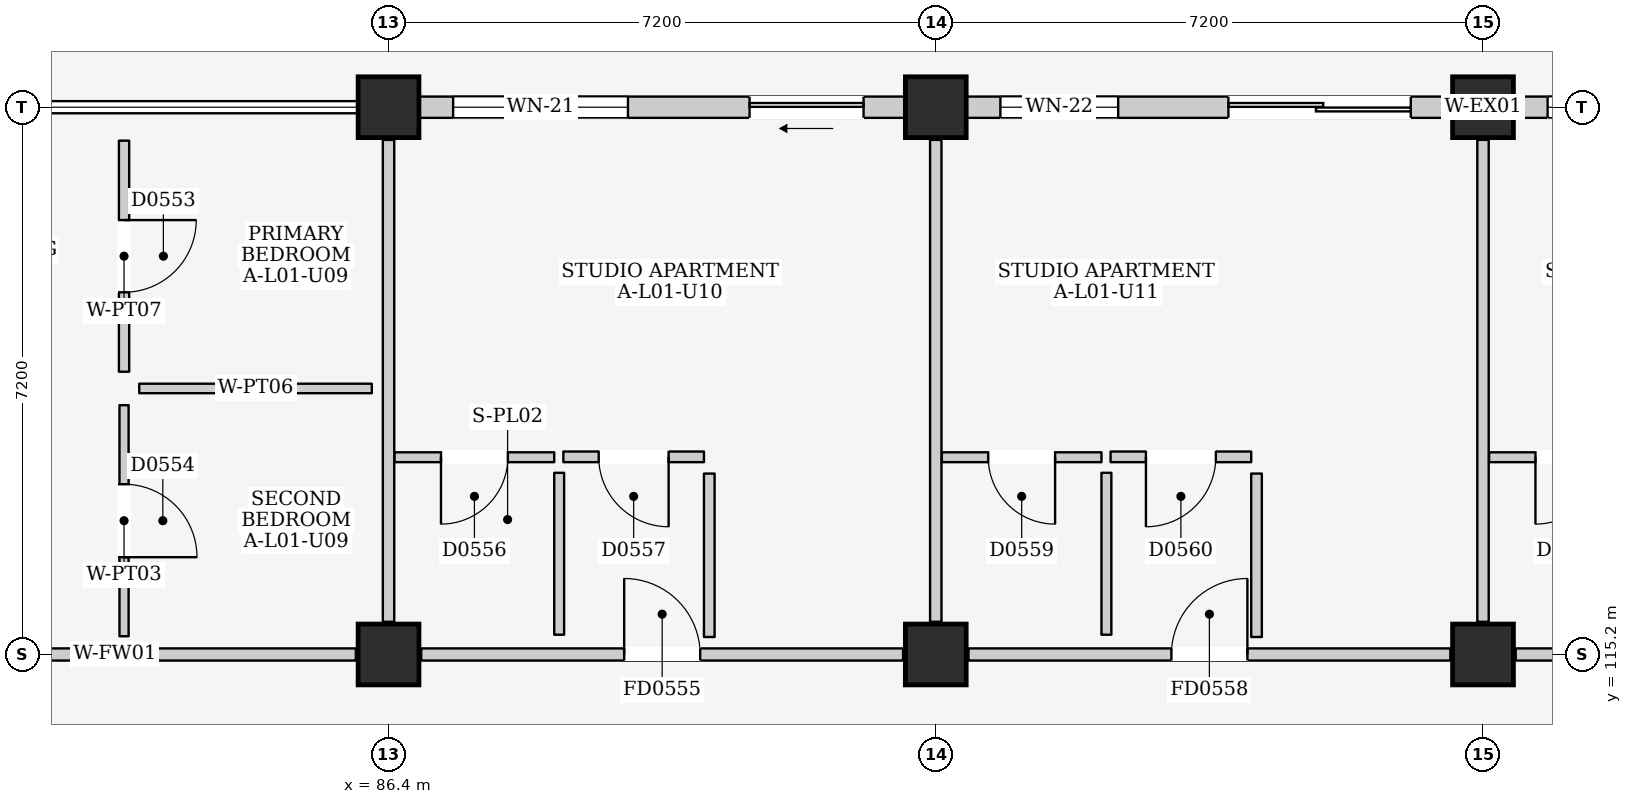
"""IFC4 building model, lengths in metres.
Left out: names, types, materials, properties, quantities, classifications, styles, units other than length and angle.
Written with IfcOpenShell. Run it as: python <this file> out.ifc"""

import sys

from ifc_helpers import new_model, si_unit, direction, frame, frame_2d, origin, origin_2d, place, context, subcontext, project, spatial, rectangle, extrude, element, fill, save


model = new_model("IFC4")
c1 = context("Model", 3, precision=1e-05, world=origin(), true_north=direction((0.0, 1.0)))
c2 = subcontext(c1, "Body", "Model", "MODEL_VIEW")
j1 = project(units=[si_unit("LENGTHUNIT", "METRE"), si_unit("PLANEANGLEUNIT", "RADIAN")], contexts=[c1])
p1 = place(None, origin())
s1 = spatial("IfcSite", under=j1, at=p1, CompositionType="ELEMENT")
p2 = place(p1, origin())
s2 = spatial("IfcBuilding", under=s1, at=p2, CompositionType="ELEMENT")
p3 = place(p2, frame((0.0, 0.0, 4.5)))
s3 = spatial("IfcBuildingStorey", under=s2, at=p3, CompositionType="ELEMENT", Elevation=4.5)
for number, where, z_axis, x_axis in (
    (1, (86.4, 115.2, 0.0), (0.0, 0.0, 1.0), (1.0, 0.0, 0.0)),
    (2, (86.4, 122.4, 0.0), (0.0, 0.0, 1.0), (1.0, 0.0, 0.0)),
    (3, (93.6, 115.2, 0.0), (0.0, 0.0, 1.0), (1.0, 0.0, 0.0)),
    (4, (93.6, 122.4, 0.0), (0.0, 0.0, 1.0), (1.0, 0.0, 0.0)),
    (5, (100.8, 115.2, 0.0), (0.0, 0.0, 1.0), (1.0, 0.0, 0.0)),
    (6, (100.8, 122.4, 0.0), (0.0, 0.0, 1.0), (1.0, 0.0, 0.0)),
):
    element("IfcColumn", number, at=place(p3, frame(where, z_axis=z_axis, x_axis=x_axis)), inside=s3, PredefinedType="COLUMN", context=c2, shape_type="SweptSolid", body=[
        extrude(rectangle(XDim=0.8, YDim=0.8, at=origin_2d()), origin(), (0.0, 0.0, 1.0), 4.5),
    ])
p4 = place(p3, frame((86.8, 122.4, 0.0), z_axis=(0.0, 0.0, 1.0), x_axis=(1.0, 0.0, 0.0)))
e7 = element("IfcWall", 7, at=p4, inside=s3, PredefinedType="ELEMENTEDWALL", context=c2, shape_type="SweptSolid", body=[
    extrude(rectangle(XDim=6.4, YDim=0.28, at=frame_2d((3.2, 0.0))), origin(), (0.0, 0.0, 1.0), 3.715),
])
p5 = place(p4, frame((4.35, 0.0, 0.0)))
e8 = element("IfcOpeningElement", 8, at=p5, cuts=e7, PredefinedType="OPENING", context=c2, shape_type="SweptSolid", body=[
    extrude(rectangle(XDim=1.5, YDim=2.12, at=frame_2d((0.75, 1.06))), frame((0.0, 0.155, 0.0), z_axis=(0.0, -1.0, 0.0), x_axis=(1.0, 0.0, 0.0)), (0.0, 0.0, 1.0), 0.31),
])
p6 = place(p4, frame((0.45, 0.0, 0.9)))
e9 = element("IfcOpeningElement", 9, at=p6, cuts=e7, PredefinedType="OPENING", context=c2, shape_type="SweptSolid", body=[
    extrude(rectangle(XDim=2.3, YDim=1.6, at=frame_2d((1.15, 0.8))), frame((0.0, 0.155, 0.0), z_axis=(0.0, -1.0, 0.0), x_axis=(1.0, 0.0, 0.0)), (0.0, 0.0, 1.0), 0.31),
])
p7 = place(p3, frame((94.0, 122.4, 0.0), z_axis=(0.0, 0.0, 1.0), x_axis=(1.0, 0.0, 0.0)))
e10 = element("IfcWall", 10, at=p7, inside=s3, PredefinedType="ELEMENTEDWALL", context=c2, shape_type="SweptSolid", body=[
    extrude(rectangle(XDim=6.4, YDim=0.28, at=frame_2d((3.2, 0.0))), origin(), (0.0, 0.0, 1.0), 3.715),
])
p8 = place(p7, frame((3.45, 0.0, 0.0)))
e11 = element("IfcOpeningElement", 11, at=p8, cuts=e10, PredefinedType="OPENING", context=c2, shape_type="SweptSolid", body=[
    extrude(rectangle(XDim=2.4, YDim=2.12, at=frame_2d((1.2, 1.06))), frame((0.0, 0.155, 0.0), z_axis=(0.0, -1.0, 0.0), x_axis=(1.0, 0.0, 0.0)), (0.0, 0.0, 1.0), 0.31),
])
p9 = place(p7, frame((0.45, 0.0, 0.9)))
e12 = element("IfcOpeningElement", 12, at=p9, cuts=e10, PredefinedType="OPENING", context=c2, shape_type="SweptSolid", body=[
    extrude(rectangle(XDim=1.55, YDim=1.45, at=frame_2d((0.775, 0.725))), frame((0.0, 0.155, 0.0), z_axis=(0.0, -1.0, 0.0), x_axis=(1.0, 0.0, 0.0)), (0.0, 0.0, 1.0), 0.31),
])
p10 = place(p3, frame((101.2, 122.4, 0.0), z_axis=(0.0, 0.0, 1.0), x_axis=(1.0, 0.0, 0.0)))
e13 = element("IfcWall", 13, at=p10, inside=s3, PredefinedType="ELEMENTEDWALL", context=c2, shape_type="SweptSolid", body=[
    extrude(rectangle(XDim=6.4, YDim=0.28, at=frame_2d((3.2, 0.0))), origin(), (0.0, 0.0, 1.0), 3.715),
])
p11 = place(p10, frame((3.85, 0.0, 0.0)))
e14 = element("IfcOpeningElement", 14, at=p11, cuts=e13, PredefinedType="OPENING", context=c2, shape_type="SweptSolid", body=[
    extrude(rectangle(XDim=2.0, YDim=2.12, at=frame_2d((1.0, 1.06))), frame((0.0, 0.155, 0.0), z_axis=(0.0, -1.0, 0.0), x_axis=(1.0, 0.0, 0.0)), (0.0, 0.0, 1.0), 0.31),
])
p12 = place(p10, frame((0.45, 0.0, 0.9)))
e15 = element("IfcOpeningElement", 15, at=p12, cuts=e13, PredefinedType="OPENING", context=c2, shape_type="SweptSolid", body=[
    extrude(rectangle(XDim=1.85, YDim=1.4, at=frame_2d((0.925, 0.7))), frame((0.0, 0.155, 0.0), z_axis=(0.0, -1.0, 0.0), x_axis=(1.0, 0.0, 0.0)), (0.0, 0.0, 1.0), 0.31),
])
p13 = place(p3, frame((79.63, 115.2, 0.0), z_axis=(0.0, 0.0, 1.0), x_axis=(1.0, 0.0, 0.0)))
e16 = element("IfcWall", 16, at=p13, inside=s3, PredefinedType="PARTITIONING", context=c2, shape_type="SweptSolid", body=[
    extrude(rectangle(XDim=6.34, YDim=0.16, at=frame_2d((3.17, 0.0))), origin(), (0.0, 0.0, 1.0), 3.585),
])
p14 = place(p3, frame((86.4, 115.63, 0.0), z_axis=(0.0, 0.0, 1.0), x_axis=(0.0, 1.0, 0.0)))
e17 = element("IfcWall", 17, at=p14, inside=s3, PredefinedType="PARTITIONING", context=c2, shape_type="SweptSolid", body=[
    extrude(rectangle(XDim=6.34, YDim=0.15, at=frame_2d((3.17, 0.0))), origin(), (0.0, 0.0, 1.0), 3.685),
])
p15 = place(p3, frame((82.92, 118.92, 0.0), z_axis=(0.0, 0.0, 1.0), x_axis=(0.0, 1.0, 0.0)))
e18 = element("IfcWall", 18, at=p15, inside=s3, PredefinedType="PARTITIONING", context=c2, shape_type="SweptSolid", body=[
    extrude(rectangle(XDim=3.04, YDim=0.135, at=frame_2d((1.52, 0.0))), origin(), (0.0, 0.0, 1.0), 4.25),
])
p16 = place(p15, frame((1.045, 0.0, 0.0)))
e19 = element("IfcOpeningElement", 19, at=p16, cuts=e18, PredefinedType="OPENING", context=c2, shape_type="SweptSolid", body=[
    extrude(rectangle(XDim=0.95, YDim=2.15, at=frame_2d((0.475, 1.075))), frame((0.0, 0.083, 0.0), z_axis=(0.0, -1.0, 0.0), x_axis=(1.0, 0.0, 0.0)), (0.0, 0.0, 1.0), 0.165),
])
p17 = place(p3, frame((83.12, 118.7, 0.0), z_axis=(0.0, 0.0, 1.0), x_axis=(1.0, 0.0, 0.0)))
e20 = element("IfcWall", 20, at=p17, inside=s3, PredefinedType="PARTITIONING", context=c2, shape_type="SweptSolid", body=[
    extrude(rectangle(XDim=3.06, YDim=0.125, at=frame_2d((1.53, 0.0))), origin(), (0.0, 0.0, 1.0), 4.25),
])
p18 = place(p3, frame((82.92, 115.44, 0.0), z_axis=(0.0, 0.0, 1.0), x_axis=(0.0, 1.0, 0.0)))
e21 = element("IfcWall", 21, at=p18, inside=s3, PredefinedType="PARTITIONING", context=c2, shape_type="SweptSolid", body=[
    extrude(rectangle(XDim=3.04, YDim=0.12, at=frame_2d((1.52, 0.0))), origin(), (0.0, 0.0, 1.0), 4.25),
])
p19 = place(p18, frame((1.04, 0.0, 0.0)))
e22 = element("IfcOpeningElement", 22, at=p19, cuts=e21, PredefinedType="OPENING", context=c2, shape_type="SweptSolid", body=[
    extrude(rectangle(XDim=0.96, YDim=2.15, at=frame_2d((0.48, 1.075))), frame((0.0, 0.075, 0.0), z_axis=(0.0, -1.0, 0.0), x_axis=(1.0, 0.0, 0.0)), (0.0, 0.0, 1.0), 0.15),
])
p20 = place(p3, frame((86.83, 115.2, 0.0), z_axis=(0.0, 0.0, 1.0), x_axis=(1.0, 0.0, 0.0)))
e23 = element("IfcWall", 23, at=p20, inside=s3, PredefinedType="PARTITIONING", context=c2, shape_type="SweptSolid", body=[
    extrude(rectangle(XDim=6.34, YDim=0.16, at=frame_2d((3.17, 0.0))), origin(), (0.0, 0.0, 1.0), 3.585),
])
p21 = place(p20, frame((2.67, 0.0, 0.0)))
e24 = element("IfcOpeningElement", 24, at=p21, cuts=e23, PredefinedType="OPENING", context=c2, shape_type="SweptSolid", body=[
    extrude(rectangle(XDim=1.0, YDim=2.15, at=frame_2d((0.5, 1.075))), frame((0.0, 0.095, 0.0), z_axis=(0.0, -1.0, 0.0), x_axis=(1.0, 0.0, 0.0)), (0.0, 0.0, 1.0), 0.19),
])
p22 = place(p3, frame((93.6, 115.63, 0.0), z_axis=(0.0, 0.0, 1.0), x_axis=(0.0, 1.0, 0.0)))
e25 = element("IfcWall", 25, at=p22, inside=s3, PredefinedType="PARTITIONING", context=c2, shape_type="SweptSolid", body=[
    extrude(rectangle(XDim=6.34, YDim=0.15, at=frame_2d((3.17, 0.0))), origin(), (0.0, 0.0, 1.0), 3.685),
])
p23 = place(p3, frame((86.48, 117.795, 0.0), z_axis=(0.0, 0.0, 1.0), x_axis=(1.0, 0.0, 0.0)))
e26 = element("IfcWall", 26, at=p23, inside=s3, PredefinedType="PARTITIONING", context=c2, shape_type="SweptSolid", body=[
    extrude(rectangle(XDim=2.1, YDim=0.13, at=frame_2d((1.05, 0.0))), origin(), (0.0, 0.0, 1.0), 4.25),
])
p24 = place(p23, frame((0.61, 0.0, 0.0)))
e27 = element("IfcOpeningElement", 27, at=p24, cuts=e26, PredefinedType="OPENING", context=c2, shape_type="SweptSolid", body=[
    extrude(rectangle(XDim=0.88, YDim=2.1, at=frame_2d((0.44, 1.05))), frame((0.0, 0.08, 0.0), z_axis=(0.0, -1.0, 0.0), x_axis=(1.0, 0.0, 0.0)), (0.0, 0.0, 1.0), 0.16),
])
p25 = place(p3, frame((88.645, 115.46, 0.0), z_axis=(0.0, 0.0, 1.0), x_axis=(0.0, 1.0, 0.0)))
e28 = element("IfcWall", 28, at=p25, inside=s3, PredefinedType="PARTITIONING", context=c2, shape_type="SweptSolid", body=[
    extrude(rectangle(XDim=2.13, YDim=0.13, at=frame_2d((1.065, 0.0))), origin(), (0.0, 0.0, 1.0), 4.25),
])
p26 = place(p3, frame((88.7, 117.8, 0.0), z_axis=(0.0, 0.0, 1.0), x_axis=(1.0, 0.0, 0.0)))
e29 = element("IfcWall", 29, at=p26, inside=s3, PredefinedType="PARTITIONING", context=c2, shape_type="SweptSolid", body=[
    extrude(rectangle(XDim=1.85, YDim=0.14, at=frame_2d((0.925, 0.0))), origin(), (0.0, 0.0, 1.0), 4.25),
])
p27 = place(p26, frame((0.465, 0.0, 0.0)))
e30 = element("IfcOpeningElement", 30, at=p27, cuts=e29, PredefinedType="OPENING", context=c2, shape_type="SweptSolid", body=[
    extrude(rectangle(XDim=0.92, YDim=2.1, at=frame_2d((0.46, 1.05))), frame((0.0, 0.085, 0.0), z_axis=(0.0, -1.0, 0.0), x_axis=(1.0, 0.0, 0.0)), (0.0, 0.0, 1.0), 0.17),
])
p28 = place(p3, frame((90.62, 115.43, 0.0), z_axis=(0.0, 0.0, 1.0), x_axis=(0.0, 1.0, 0.0)))
e31 = element("IfcWall", 31, at=p28, inside=s3, PredefinedType="PARTITIONING", context=c2, shape_type="SweptSolid", body=[
    extrude(rectangle(XDim=2.15, YDim=0.14, at=frame_2d((1.075, 0.0))), origin(), (0.0, 0.0, 1.0), 4.25),
])
p29 = place(p3, frame((94.03, 115.2, 0.0), z_axis=(0.0, 0.0, 1.0), x_axis=(1.0, 0.0, 0.0)))
e32 = element("IfcWall", 32, at=p29, inside=s3, PredefinedType="PARTITIONING", context=c2, shape_type="SweptSolid", body=[
    extrude(rectangle(XDim=6.34, YDim=0.16, at=frame_2d((3.17, 0.0))), origin(), (0.0, 0.0, 1.0), 3.585),
])
p30 = place(p29, frame((2.67, 0.0, 0.0)))
e33 = element("IfcOpeningElement", 33, at=p30, cuts=e32, PredefinedType="OPENING", context=c2, shape_type="SweptSolid", body=[
    extrude(rectangle(XDim=1.0, YDim=2.15, at=frame_2d((0.5, 1.075))), frame((0.0, 0.095, 0.0), z_axis=(0.0, -1.0, 0.0), x_axis=(1.0, 0.0, 0.0)), (0.0, 0.0, 1.0), 0.19),
])
p31 = place(p3, frame((100.8, 115.63, 0.0), z_axis=(0.0, 0.0, 1.0), x_axis=(0.0, 1.0, 0.0)))
e34 = element("IfcWall", 34, at=p31, inside=s3, PredefinedType="PARTITIONING", context=c2, shape_type="SweptSolid", body=[
    extrude(rectangle(XDim=6.34, YDim=0.15, at=frame_2d((3.17, 0.0))), origin(), (0.0, 0.0, 1.0), 3.685),
])
p32 = place(p3, frame((93.68, 117.795, 0.0), z_axis=(0.0, 0.0, 1.0), x_axis=(1.0, 0.0, 0.0)))
e35 = element("IfcWall", 35, at=p32, inside=s3, PredefinedType="PARTITIONING", context=c2, shape_type="SweptSolid", body=[
    extrude(rectangle(XDim=2.1, YDim=0.13, at=frame_2d((1.05, 0.0))), origin(), (0.0, 0.0, 1.0), 4.25),
])
p33 = place(p32, frame((0.61, 0.0, 0.0)))
e36 = element("IfcOpeningElement", 36, at=p33, cuts=e35, PredefinedType="OPENING", context=c2, shape_type="SweptSolid", body=[
    extrude(rectangle(XDim=0.88, YDim=2.1, at=frame_2d((0.44, 1.05))), frame((0.0, 0.08, 0.0), z_axis=(0.0, -1.0, 0.0), x_axis=(1.0, 0.0, 0.0)), (0.0, 0.0, 1.0), 0.16),
])
p34 = place(p3, frame((95.845, 115.46, 0.0), z_axis=(0.0, 0.0, 1.0), x_axis=(0.0, 1.0, 0.0)))
e37 = element("IfcWall", 37, at=p34, inside=s3, PredefinedType="PARTITIONING", context=c2, shape_type="SweptSolid", body=[
    extrude(rectangle(XDim=2.13, YDim=0.13, at=frame_2d((1.065, 0.0))), origin(), (0.0, 0.0, 1.0), 4.25),
])
p35 = place(p3, frame((95.9, 117.8, 0.0), z_axis=(0.0, 0.0, 1.0), x_axis=(1.0, 0.0, 0.0)))
e38 = element("IfcWall", 38, at=p35, inside=s3, PredefinedType="PARTITIONING", context=c2, shape_type="SweptSolid", body=[
    extrude(rectangle(XDim=1.85, YDim=0.14, at=frame_2d((0.925, 0.0))), origin(), (0.0, 0.0, 1.0), 4.25),
])
p36 = place(p35, frame((0.465, 0.0, 0.0)))
e39 = element("IfcOpeningElement", 39, at=p36, cuts=e38, PredefinedType="OPENING", context=c2, shape_type="SweptSolid", body=[
    extrude(rectangle(XDim=0.92, YDim=2.1, at=frame_2d((0.46, 1.05))), frame((0.0, 0.085, 0.0), z_axis=(0.0, -1.0, 0.0), x_axis=(1.0, 0.0, 0.0)), (0.0, 0.0, 1.0), 0.17),
])
p37 = place(p3, frame((97.82, 115.43, 0.0), z_axis=(0.0, 0.0, 1.0), x_axis=(0.0, 1.0, 0.0)))
e40 = element("IfcWall", 40, at=p37, inside=s3, PredefinedType="PARTITIONING", context=c2, shape_type="SweptSolid", body=[
    extrude(rectangle(XDim=2.15, YDim=0.14, at=frame_2d((1.075, 0.0))), origin(), (0.0, 0.0, 1.0), 4.25),
])
p38 = place(p3, frame((101.23, 115.2, 0.0), z_axis=(0.0, 0.0, 1.0), x_axis=(1.0, 0.0, 0.0)))
e41 = element("IfcWall", 41, at=p38, inside=s3, PredefinedType="PARTITIONING", context=c2, shape_type="SweptSolid", body=[
    extrude(rectangle(XDim=6.34, YDim=0.16, at=frame_2d((3.17, 0.0))), origin(), (0.0, 0.0, 1.0), 3.585),
])
p39 = place(p38, frame((2.67, 0.0, 0.0)))
e42 = element("IfcOpeningElement", 42, at=p39, cuts=e41, PredefinedType="OPENING", context=c2, shape_type="SweptSolid", body=[
    extrude(rectangle(XDim=1.0, YDim=2.15, at=frame_2d((0.5, 1.075))), frame((0.0, 0.095, 0.0), z_axis=(0.0, -1.0, 0.0), x_axis=(1.0, 0.0, 0.0)), (0.0, 0.0, 1.0), 0.19),
])
p40 = place(p3, frame((100.88, 117.795, 0.0), z_axis=(0.0, 0.0, 1.0), x_axis=(1.0, 0.0, 0.0)))
e43 = element("IfcWall", 43, at=p40, inside=s3, PredefinedType="PARTITIONING", context=c2, shape_type="SweptSolid", body=[
    extrude(rectangle(XDim=2.1, YDim=0.13, at=frame_2d((1.05, 0.0))), origin(), (0.0, 0.0, 1.0), 4.25),
])
p41 = place(p40, frame((0.61, 0.0, 0.0)))
e44 = element("IfcOpeningElement", 44, at=p41, cuts=e43, PredefinedType="OPENING", context=c2, shape_type="SweptSolid", body=[
    extrude(rectangle(XDim=0.88, YDim=2.1, at=frame_2d((0.44, 1.05))), frame((0.0, 0.08, 0.0), z_axis=(0.0, -1.0, 0.0), x_axis=(1.0, 0.0, 0.0)), (0.0, 0.0, 1.0), 0.16),
])
p42 = place(p5, frame((1.5, 0.0, 0.0), z_axis=(0.0, 0.0, 1.0), x_axis=(-1.0, 0.0, 0.0)))
e45 = element("IfcDoor", 45, at=p42, inside=s3, OperationType="SLIDING_TO_LEFT", PredefinedType="DOOR", context=c2, shape_type="SweptSolid", body=[
    extrude(rectangle(XDim=1.5, YDim=2.12, at=frame_2d((0.75, 1.06))), frame((0.0, 0.025, 0.0), z_axis=(0.0, -1.0, 0.0), x_axis=(1.0, 0.0, 0.0)), (0.0, 0.0, 1.0), 0.05),
])
fill(e8, e45)
p43 = place(p6, origin())
e46 = element("IfcWindow", 46, at=p43, inside=s3, PartitioningType="TRIPLE_PANEL_VERTICAL", PredefinedType="WINDOW", context=c2, shape_type="SweptSolid", body=[
    extrude(rectangle(XDim=2.3, YDim=1.6, at=frame_2d((1.15, 0.8))), frame((0.0, 0.03, 0.0), z_axis=(0.0, -1.0, 0.0), x_axis=(1.0, 0.0, 0.0)), (0.0, 0.0, 1.0), 0.06),
])
fill(e9, e46)
p44 = place(p8, frame((2.4, 0.0, 0.0), z_axis=(0.0, 0.0, 1.0), x_axis=(-1.0, 0.0, 0.0)))
e47 = element("IfcDoor", 47, at=p44, inside=s3, OperationType="DOUBLE_DOOR_SLIDING", PredefinedType="DOOR", context=c2, shape_type="SweptSolid", body=[
    extrude(rectangle(XDim=2.4, YDim=2.12, at=frame_2d((1.2, 1.06))), frame((0.0, 0.025, 0.0), z_axis=(0.0, -1.0, 0.0), x_axis=(1.0, 0.0, 0.0)), (0.0, 0.0, 1.0), 0.05),
])
fill(e11, e47)
p45 = place(p9, origin())
e48 = element("IfcWindow", 48, at=p45, inside=s3, PartitioningType="DOUBLE_PANEL_VERTICAL", PredefinedType="WINDOW", context=c2, shape_type="SweptSolid", body=[
    extrude(rectangle(XDim=1.55, YDim=1.45, at=frame_2d((0.775, 0.725))), frame((0.0, 0.03, 0.0), z_axis=(0.0, -1.0, 0.0), x_axis=(1.0, 0.0, 0.0)), (0.0, 0.0, 1.0), 0.06),
])
fill(e12, e48)
p46 = place(p12, origin())
e49 = element("IfcWindow", 49, at=p46, inside=s3, PartitioningType="DOUBLE_PANEL_VERTICAL", PredefinedType="WINDOW", context=c2, shape_type="SweptSolid", body=[
    extrude(rectangle(XDim=1.85, YDim=1.4, at=frame_2d((0.925, 0.7))), frame((0.0, 0.03, 0.0), z_axis=(0.0, -1.0, 0.0), x_axis=(1.0, 0.0, 0.0)), (0.0, 0.0, 1.0), 0.06),
])
fill(e15, e49)
p47 = place(p16, frame((0.95, 0.0, 0.0), z_axis=(0.0, 0.0, 1.0), x_axis=(-1.0, 0.0, 0.0)))
e50 = element("IfcDoor", 50, at=p47, inside=s3, OperationType="SINGLE_SWING_LEFT", PredefinedType="DOOR", context=c2, shape_type="SweptSolid", body=[
    extrude(rectangle(XDim=0.95, YDim=2.15, at=frame_2d((0.475, 1.075))), frame((0.0, 0.025, 0.0), z_axis=(0.0, -1.0, 0.0), x_axis=(1.0, 0.0, 0.0)), (0.0, 0.0, 1.0), 0.05),
])
fill(e19, e50)
p48 = place(p19, frame((0.96, 0.0, 0.0), z_axis=(0.0, 0.0, 1.0), x_axis=(-1.0, 0.0, 0.0)))
e51 = element("IfcDoor", 51, at=p48, inside=s3, OperationType="SINGLE_SWING_RIGHT", PredefinedType="DOOR", context=c2, shape_type="SweptSolid", body=[
    extrude(rectangle(XDim=0.96, YDim=2.15, at=frame_2d((0.48, 1.075))), frame((0.0, 0.025, 0.0), z_axis=(0.0, -1.0, 0.0), x_axis=(1.0, 0.0, 0.0)), (0.0, 0.0, 1.0), 0.05),
])
fill(e22, e51)
p49 = place(p21, origin())
e52 = element("IfcDoor", 52, at=p49, inside=s3, OperationType="SINGLE_SWING_LEFT", PredefinedType="DOOR", context=c2, shape_type="SweptSolid", body=[
    extrude(rectangle(XDim=1.0, YDim=2.15, at=frame_2d((0.5, 1.075))), frame((0.0, 0.025, 0.0), z_axis=(0.0, -1.0, 0.0), x_axis=(1.0, 0.0, 0.0)), (0.0, 0.0, 1.0), 0.05),
])
fill(e24, e52)
p50 = place(p24, frame((0.88, 0.0, 0.0), z_axis=(0.0, 0.0, 1.0), x_axis=(-1.0, 0.0, 0.0)))
e53 = element("IfcDoor", 53, at=p50, inside=s3, OperationType="SINGLE_SWING_RIGHT", PredefinedType="DOOR", context=c2, shape_type="SweptSolid", body=[
    extrude(rectangle(XDim=0.88, YDim=2.1, at=frame_2d((0.44, 1.05))), frame((0.0, 0.025, 0.0), z_axis=(0.0, -1.0, 0.0), x_axis=(1.0, 0.0, 0.0)), (0.0, 0.0, 1.0), 0.05),
])
fill(e27, e53)
p51 = place(p27, frame((0.92, 0.0, 0.0), z_axis=(0.0, 0.0, 1.0), x_axis=(-1.0, 0.0, 0.0)))
e54 = element("IfcDoor", 54, at=p51, inside=s3, OperationType="SINGLE_SWING_LEFT", PredefinedType="DOOR", context=c2, shape_type="SweptSolid", body=[
    extrude(rectangle(XDim=0.92, YDim=2.1, at=frame_2d((0.46, 1.05))), frame((0.0, 0.025, 0.0), z_axis=(0.0, -1.0, 0.0), x_axis=(1.0, 0.0, 0.0)), (0.0, 0.0, 1.0), 0.05),
])
fill(e30, e54)
p52 = place(p30, origin())
e55 = element("IfcDoor", 55, at=p52, inside=s3, OperationType="SINGLE_SWING_RIGHT", PredefinedType="DOOR", context=c2, shape_type="SweptSolid", body=[
    extrude(rectangle(XDim=1.0, YDim=2.15, at=frame_2d((0.5, 1.075))), frame((0.0, 0.025, 0.0), z_axis=(0.0, -1.0, 0.0), x_axis=(1.0, 0.0, 0.0)), (0.0, 0.0, 1.0), 0.05),
])
fill(e33, e55)
p53 = place(p33, frame((0.88, 0.0, 0.0), z_axis=(0.0, 0.0, 1.0), x_axis=(-1.0, 0.0, 0.0)))
e56 = element("IfcDoor", 56, at=p53, inside=s3, OperationType="SINGLE_SWING_LEFT", PredefinedType="DOOR", context=c2, shape_type="SweptSolid", body=[
    extrude(rectangle(XDim=0.88, YDim=2.1, at=frame_2d((0.44, 1.05))), frame((0.0, 0.025, 0.0), z_axis=(0.0, -1.0, 0.0), x_axis=(1.0, 0.0, 0.0)), (0.0, 0.0, 1.0), 0.05),
])
fill(e36, e56)
p54 = place(p36, frame((0.92, 0.0, 0.0), z_axis=(0.0, 0.0, 1.0), x_axis=(-1.0, 0.0, 0.0)))
e57 = element("IfcDoor", 57, at=p54, inside=s3, OperationType="SINGLE_SWING_RIGHT", PredefinedType="DOOR", context=c2, shape_type="SweptSolid", body=[
    extrude(rectangle(XDim=0.92, YDim=2.1, at=frame_2d((0.46, 1.05))), frame((0.0, 0.025, 0.0), z_axis=(0.0, -1.0, 0.0), x_axis=(1.0, 0.0, 0.0)), (0.0, 0.0, 1.0), 0.05),
])
fill(e39, e57)
p55 = place(p41, frame((0.88, 0.0, 0.0), z_axis=(0.0, 0.0, 1.0), x_axis=(-1.0, 0.0, 0.0)))
e58 = element("IfcDoor", 58, at=p55, inside=s3, OperationType="SINGLE_SWING_RIGHT", PredefinedType="DOOR", context=c2, shape_type="SweptSolid", body=[
    extrude(rectangle(XDim=0.88, YDim=2.1, at=frame_2d((0.44, 1.05))), frame((0.0, 0.025, 0.0), z_axis=(0.0, -1.0, 0.0), x_axis=(1.0, 0.0, 0.0)), (0.0, 0.0, 1.0), 0.05),
])
fill(e44, e58)
save(model, sys.argv[1])
